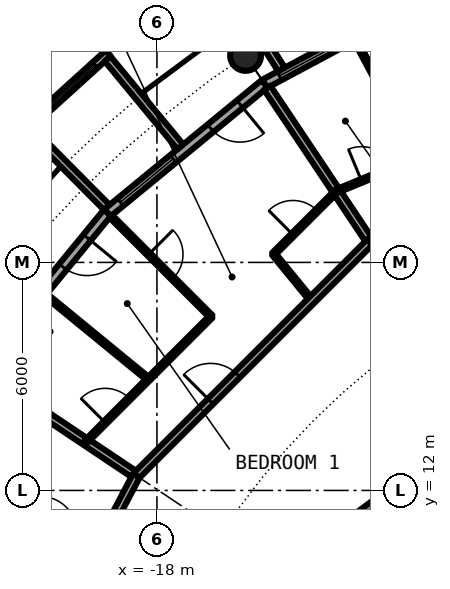
"""IFC4 building model, lengths in metres.
Left out: names, types, materials, properties, quantities, classifications, styles, units other than length and angle.
Written with IfcOpenShell. Run it as: python <this file> out.ifc"""

import sys

from ifc_helpers import new_model, si_unit, direction, frame, frame_2d, origin, origin_2d, place, context, subcontext, project, spatial, rectangle, circle, hollow_circle, extrude, element, fill, save


model = new_model("IFC4")
c1 = context("Model", 3, precision=1e-05, world=origin(), true_north=direction((0.0, 1.0)))
c2 = subcontext(c1, "Body", "Model", "MODEL_VIEW")
j1 = project(units=[si_unit("LENGTHUNIT", "METRE"), si_unit("PLANEANGLEUNIT", "RADIAN")], contexts=[c1])
p1 = place(None, origin())
s1 = spatial("IfcSite", under=j1, at=p1, CompositionType="ELEMENT")
p2 = place(p1, origin())
s2 = spatial("IfcBuilding", under=s1, at=p2, CompositionType="ELEMENT")
p3 = place(p2, frame((0.0, 0.0, 170.75)))
s3 = spatial("IfcBuildingStorey", under=s2, at=p3, CompositionType="ELEMENT", Elevation=170.75)
p4 = place(p3, frame((-15.667, 23.448, 0.0), z_axis=(0.0, 0.0, 1.0), x_axis=(1.0, 0.0, 0.0)))
e1 = element("IfcColumn", 1, at=p4, inside=s3, PredefinedType="COLUMN", context=c2, shape_type="SweptSolid", body=[
    extrude(hollow_circle(Radius=0.406, WallThickness=0.04, at=origin_2d()), origin(), (0.0, 0.0, 1.0), 3.05),
])
p5 = place(p3, frame((-10.447, 25.222, 0.0), z_axis=(0.0, 0.0, 1.0), x_axis=(-0.881915646801, -0.471407246368, 0.0)))
e2 = element("IfcWall", 2, at=p5, inside=s3, PredefinedType="SOLIDWALL", context=c2, shape_type="SweptSolid", body=[
    extrude(rectangle(XDim=5.352, YDim=0.25, at=frame_2d((2.676, 0.0))), origin(), (0.0, 0.0, 1.0), 2.7),
])
p6 = place(p5, frame((0.841, 0.0, 0.0)))
e3 = element("IfcOpeningElement", 3, at=p6, cuts=e2, PredefinedType="OPENING", context=c2, shape_type="SweptSolid", body=[
    extrude(rectangle(XDim=1.0, YDim=2.2, at=frame_2d((0.5, 1.1))), frame((0.0, 0.135, 0.0), z_axis=(0.0, -1.0, 0.0), x_axis=(1.0, 0.0, 0.0)), (0.0, 0.0, 1.0), 0.27),
])
p7 = place(p5, frame((3.111, 0.0, 0.3)))
e4 = element("IfcOpeningElement", 4, at=p7, cuts=e2, PredefinedType="OPENING", context=c2, shape_type="SweptSolid", body=[
    extrude(rectangle(XDim=1.8, YDim=2.1, at=frame_2d((0.9, 1.05))), frame((0.0, 0.135, 0.0), z_axis=(0.0, -1.0, 0.0), x_axis=(1.0, 0.0, 0.0)), (0.0, 0.0, 1.0), 0.27),
])
p8 = place(p3, frame((-14.722, 23.079, -0.03), z_axis=(0.0, 0.0, 1.0), x_axis=(-0.537572179146, 0.843217737129, 0.0)))
e5 = element("IfcWall", 5, at=p8, inside=s3, PredefinedType="SOLIDWALL", context=c2, shape_type="SweptSolid", body=[
    extrude(rectangle(XDim=2.924, YDim=0.2, at=frame_2d((1.462, 0.0))), origin(), (0.0, 0.0, 1.0), 2.73),
])
p9 = place(p3, frame((-15.167, 22.699, 0.0), z_axis=(0.0, 0.0, 1.0), x_axis=(-0.773019449054, -0.634382322723, 0.0)))
e6 = element("IfcWall", 6, at=p9, inside=s3, PredefinedType="SOLIDWALL", context=c2, shape_type="SweptSolid", body=[
    extrude(rectangle(XDim=5.352, YDim=0.25, at=frame_2d((2.676, 0.0))), origin(), (0.0, 0.0, 1.0), 2.7),
])
p10 = place(p9, frame((0.841, 0.0, 0.0)))
e7 = element("IfcOpeningElement", 7, at=p10, cuts=e6, PredefinedType="OPENING", context=c2, shape_type="SweptSolid", body=[
    extrude(rectangle(XDim=1.0, YDim=2.2, at=frame_2d((0.5, 1.1))), frame((0.0, 0.135, 0.0), z_axis=(0.0, -1.0, 0.0), x_axis=(1.0, 0.0, 0.0)), (0.0, 0.0, 1.0), 0.27),
])
p11 = place(p9, frame((3.111, 0.0, 0.3)))
e8 = element("IfcOpeningElement", 8, at=p11, cuts=e6, PredefinedType="OPENING", context=c2, shape_type="SweptSolid", body=[
    extrude(rectangle(XDim=1.8, YDim=2.1, at=frame_2d((0.9, 1.05))), frame((0.0, 0.135, 0.0), z_axis=(0.0, -1.0, 0.0), x_axis=(1.0, 0.0, 0.0)), (0.0, 0.0, 1.0), 0.27),
])
p12 = place(p3, frame((-19.282, 23.503, -0.03), z_axis=(0.0, 0.0, 1.0), x_axis=(-0.740998365753, -0.671506829416, 0.0)))
e9 = element("IfcWall", 9, at=p12, inside=s3, PredefinedType="SOLIDWALL", context=c2, shape_type="SweptSolid", body=[
    extrude(rectangle(XDim=2.993, YDim=0.2, at=frame_2d((1.497, 0.0))), origin(), (0.0, 0.0, 1.0), 2.73),
])
p13 = place(p12, frame((0.457, 0.0, 0.33)))
e10 = element("IfcOpeningElement", 10, at=p13, cuts=e9, PredefinedType="OPENING", context=c2, shape_type="SweptSolid", body=[
    extrude(circle(Radius=1.04, at=frame_2d((1.04, 1.04))), frame((0.0, 0.11, 0.0), z_axis=(0.0, -1.0, 0.0), x_axis=(1.0, 0.0, 0.0)), (0.0, 0.0, 1.0), 0.22),
])
p14 = place(p3, frame((-17.384, 21.041, -0.03), z_axis=(0.0, 0.0, 1.0), x_axis=(-0.63709551667, 0.770784861449, 0.0)))
e11 = element("IfcWall", 11, at=p14, inside=s3, PredefinedType="SOLIDWALL", context=c2, shape_type="SweptSolid", body=[
    extrude(rectangle(XDim=3.006, YDim=0.2, at=frame_2d((1.503, 0.0))), origin(), (0.0, 0.0, 1.0), 2.73),
])
p15 = place(p3, frame((-19.323, 19.45, -0.03), z_axis=(0.0, 0.0, 1.0), x_axis=(-0.704476739375, 0.709727076896, 0.0)))
e12 = element("IfcWall", 12, at=p15, inside=s3, PredefinedType="SOLIDWALL", context=c2, shape_type="SweptSolid", body=[
    extrude(rectangle(XDim=2.883, YDim=0.2, at=frame_2d((1.441, 0.0))), origin(), (0.0, 0.0, 1.0), 2.73),
])
p16 = place(p3, frame((-19.304, 19.304, 0.0), z_axis=(0.0, 0.0, 1.0), x_axis=(-0.634382322723, -0.773019449054, 0.0)))
e13 = element("IfcWall", 13, at=p16, inside=s3, PredefinedType="SOLIDWALL", context=c2, shape_type="SweptSolid", body=[
    extrude(rectangle(XDim=5.352, YDim=0.25, at=frame_2d((2.676, 0.0))), origin(), (0.0, 0.0, 1.0), 2.7),
])
p17 = place(p16, frame((0.841, 0.0, 0.0)))
e14 = element("IfcOpeningElement", 14, at=p17, cuts=e13, PredefinedType="OPENING", context=c2, shape_type="SweptSolid", body=[
    extrude(rectangle(XDim=1.0, YDim=2.2, at=frame_2d((0.5, 1.1))), frame((0.0, 0.135, 0.0), z_axis=(0.0, -1.0, 0.0), x_axis=(1.0, 0.0, 0.0)), (0.0, 0.0, 1.0), 0.27),
])
p18 = place(p16, frame((3.111, 0.0, 0.3)))
e15 = element("IfcOpeningElement", 15, at=p18, cuts=e13, PredefinedType="OPENING", context=c2, shape_type="SweptSolid", body=[
    extrude(rectangle(XDim=1.8, YDim=2.1, at=frame_2d((0.9, 1.05))), frame((0.0, 0.135, 0.0), z_axis=(0.0, -1.0, 0.0), x_axis=(1.0, 0.0, 0.0)), (0.0, 0.0, 1.0), 0.27),
])
p19 = place(p3, frame((-22.595, 15.098, 0.0), z_axis=(0.0, 0.0, 1.0), x_axis=(0.831387096605, -0.55569370664, 0.0)))
e16 = element("IfcWall", 16, at=p19, inside=s3, PredefinedType="PARTITIONING", context=c2, shape_type="SweptSolid", body=[
    extrude(rectangle(XDim=4.875, YDim=0.2, at=frame_2d((2.438, 0.0))), origin(), (0.0, 0.0, 1.0), 2.7),
])
p20 = place(p3, frame((-21.023, 17.22, 0.0), z_axis=(0.0, 0.0, 1.0), x_axis=(0.773548271597, -0.633737383709, 0.0)))
e17 = element("IfcWall", 17, at=p20, inside=s3, PredefinedType="PARTITIONING", context=c2, shape_type="SweptSolid", body=[
    extrude(rectangle(XDim=3.618, YDim=0.1, at=frame_2d((1.809, 0.0))), origin(), (0.0, 0.0, 1.0), 2.7),
])
p21 = place(p3, frame((-19.216, 19.216, 0.0), z_axis=(0.0, 0.0, 1.0), x_axis=(0.707106781187, -0.707106781187, 0.0)))
e18 = element("IfcWall", 18, at=p21, inside=s3, PredefinedType="PARTITIONING", context=c2, shape_type="SweptSolid", body=[
    extrude(rectangle(XDim=3.735, YDim=0.1, at=frame_2d((1.868, 0.0))), origin(), (0.0, 0.0, 1.0), 2.7),
])
p22 = place(p21, frame((1.417, 0.0, 0.0)))
e19 = element("IfcOpeningElement", 19, at=p22, cuts=e18, PredefinedType="OPENING", context=c2, shape_type="SweptSolid", body=[
    extrude(rectangle(XDim=0.9, YDim=2.3, at=frame_2d((0.45, 1.15))), frame((0.0, 0.06, 0.0), z_axis=(0.0, -1.0, 0.0), x_axis=(1.0, 0.0, 0.0)), (0.0, 0.0, 1.0), 0.12),
])
p23 = place(p3, frame((-15.098, 22.595, 0.0), z_axis=(0.0, 0.0, 1.0), x_axis=(0.55569370664, -0.831387096605, 0.0)))
e20 = element("IfcWall", 20, at=p23, inside=s3, PredefinedType="PARTITIONING", context=c2, shape_type="SweptSolid", body=[
    extrude(rectangle(XDim=4.875, YDim=0.2, at=frame_2d((2.438, 0.0))), origin(), (0.0, 0.0, 1.0), 2.7),
])
p24 = place(p3, frame((-14.93, 18.222, 0.0), z_axis=(0.0, 0.0, 1.0), x_axis=(0.633633636523, -0.773633255921, 0.0)))
e21 = element("IfcWall", 21, at=p24, inside=s3, PredefinedType="PARTITIONING", context=c2, shape_type="SweptSolid", body=[
    extrude(rectangle(XDim=1.578, YDim=0.1, at=frame_2d((0.789, 0.0))), origin(), (0.0, 0.0, 1.0), 2.7),
])
p25 = place(p3, frame((-12.833, 23.954, 0.0), z_axis=(0.0, 0.0, 1.0), x_axis=(0.472212052488, -0.881484984265, 0.0)))
e22 = element("IfcWall", 22, at=p25, inside=s3, PredefinedType="PARTITIONING", context=c2, shape_type="SweptSolid", body=[
    extrude(rectangle(XDim=3.619, YDim=0.1, at=frame_2d((1.81, 0.0))), origin(), (0.0, 0.0, 1.0), 2.7),
])
p26 = place(p3, frame((-13.349, 10.848, 0.0), z_axis=(0.0, 0.0, 1.0), x_axis=(0.803229232922, 0.595670042371, 0.0)))
e23 = element("IfcWall", 23, at=p26, inside=s3, PredefinedType="PARTITIONING", context=c2, shape_type="SweptSolid", body=[
    extrude(rectangle(XDim=10.224, YDim=0.2, at=frame_2d((5.112, 0.0))), origin(), (0.0, 0.0, 1.0), 2.7),
])
p27 = place(p26, frame((4.612, 0.0, 0.0)))
e24 = element("IfcOpeningElement", 24, at=p27, cuts=e23, PredefinedType="OPENING", context=c2, shape_type="SweptSolid", body=[
    extrude(rectangle(XDim=1.0, YDim=2.3, at=frame_2d((0.5, 1.15))), frame((0.0, 0.11, 0.0), z_axis=(0.0, -1.0, 0.0), x_axis=(1.0, 0.0, 0.0)), (0.0, 0.0, 1.0), 0.22),
])
p28 = place(p3, frame((-18.542, 12.389, 0.0), z_axis=(0.0, 0.0, 1.0), x_axis=(0.707106781187, 0.707106781187, 0.0)))
e25 = element("IfcWall", 25, at=p28, inside=s3, PredefinedType="PARTITIONING", context=c2, shape_type="SweptSolid", body=[
    extrude(rectangle(XDim=8.702, YDim=0.2, at=frame_2d((4.351, 0.0))), origin(), (0.0, 0.0, 1.0), 2.7),
])
p29 = place(p28, frame((2.763, 0.0, 0.0)))
e26 = element("IfcOpeningElement", 26, at=p29, cuts=e25, PredefinedType="OPENING", context=c2, shape_type="SweptSolid", body=[
    extrude(rectangle(XDim=1.0, YDim=2.3, at=frame_2d((0.5, 1.15))), frame((0.0, 0.11, 0.0), z_axis=(0.0, -1.0, 0.0), x_axis=(1.0, 0.0, 0.0)), (0.0, 0.0, 1.0), 0.22),
])
p30 = place(p3, frame((-12.396, 18.536, 0.0), z_axis=(0.0, 0.0, 1.0), x_axis=(0.923722518166, 0.383062278792, 0.0)))
e27 = element("IfcWall", 27, at=p30, inside=s3, PredefinedType="PARTITIONING", context=c2, shape_type="SweptSolid", body=[
    extrude(rectangle(XDim=8.709, YDim=0.2, at=frame_2d((4.354, 0.0))), origin(), (0.0, 0.0, 1.0), 2.7),
])
p31 = place(p30, frame((2.772, 0.0, 0.0)))
e28 = element("IfcOpeningElement", 28, at=p31, cuts=e27, PredefinedType="OPENING", context=c2, shape_type="SweptSolid", body=[
    extrude(rectangle(XDim=1.0, YDim=2.3, at=frame_2d((0.5, 1.15))), frame((0.0, 0.11, 0.0), z_axis=(0.0, -1.0, 0.0), x_axis=(1.0, 0.0, 0.0)), (0.0, 0.0, 1.0), 0.22),
])
p32 = place(p3, frame((-19.307, 10.935, 0.0), z_axis=(0.0, 0.0, 1.0), x_axis=(0.465605550524, 0.884992356646, 0.0)))
e29 = element("IfcWall", 29, at=p32, inside=s3, PredefinedType="PARTITIONING", context=c2, shape_type="SweptSolid", body=[
    extrude(rectangle(XDim=1.643, YDim=0.2, at=frame_2d((0.821, 0.0))), origin(), (0.0, 0.0, 1.0), 2.7),
])
p33 = place(p3, frame((-19.872, 13.278, 0.0), z_axis=(0.0, 0.0, 1.0), x_axis=(0.707132961115, 0.707080600289, 0.0)))
e30 = element("IfcWall", 30, at=p33, inside=s3, PredefinedType="PARTITIONING", context=c2, shape_type="SweptSolid", body=[
    extrude(rectangle(XDim=4.663, YDim=0.1, at=frame_2d((2.331, 0.0))), origin(), (0.0, 0.0, 1.0), 2.7),
])
p34 = place(p33, frame((0.719, 0.0, 0.0)))
e31 = element("IfcOpeningElement", 31, at=p34, cuts=e30, PredefinedType="OPENING", context=c2, shape_type="SweptSolid", body=[
    extrude(rectangle(XDim=0.9, YDim=2.3, at=frame_2d((0.45, 1.15))), frame((0.0, 0.06, 0.0), z_axis=(0.0, -1.0, 0.0), x_axis=(1.0, 0.0, 0.0)), (0.0, 0.0, 1.0), 0.12),
])
p35 = place(p3, frame((-14.932, 18.218, 0.0), z_axis=(0.0, 0.0, 1.0), x_axis=(0.707106781187, 0.707106781187, 0.0)))
e32 = element("IfcWall", 32, at=p35, inside=s3, PredefinedType="PARTITIONING", context=c2, shape_type="SweptSolid", body=[
    extrude(rectangle(XDim=2.332, YDim=0.1, at=frame_2d((1.166, 0.0))), origin(), (0.0, 0.0, 1.0), 2.7),
])
p36 = place(p35, frame((0.723, 0.0, 0.0)))
e33 = element("IfcOpeningElement", 33, at=p36, cuts=e32, PredefinedType="OPENING", context=c2, shape_type="SweptSolid", body=[
    extrude(rectangle(XDim=0.9, YDim=2.3, at=frame_2d((0.45, 1.15))), frame((0.0, 0.06, 0.0), z_axis=(0.0, -1.0, 0.0), x_axis=(1.0, 0.0, 0.0)), (0.0, 0.0, 1.0), 0.12),
])
p37 = place(p3, frame((-13.278, 19.872, 0.0), z_axis=(0.0, 0.0, 1.0), x_axis=(0.923920484476, 0.38258455061, 0.0)))
e34 = element("IfcWall", 34, at=p37, inside=s3, PredefinedType="PARTITIONING", context=c2, shape_type="SweptSolid", body=[
    extrude(rectangle(XDim=4.663, YDim=0.1, at=frame_2d((2.332, 0.0))), origin(), (0.0, 0.0, 1.0), 2.7),
])
p38 = place(p37, frame((0.716, 0.0, 0.0)))
e35 = element("IfcOpeningElement", 35, at=p38, cuts=e34, PredefinedType="OPENING", context=c2, shape_type="SweptSolid", body=[
    extrude(rectangle(XDim=0.9, YDim=2.3, at=frame_2d((0.45, 1.15))), frame((0.0, 0.06, 0.0), z_axis=(0.0, -1.0, 0.0), x_axis=(1.0, 0.0, 0.0)), (0.0, 0.0, 1.0), 0.12),
])
p39 = place(p7, origin())
e36 = element("IfcWindow", 36, at=p39, inside=s3, PartitioningType="SINGLE_PANEL", PredefinedType="WINDOW", context=c2, shape_type="SweptSolid", body=[
    extrude(rectangle(XDim=1.8, YDim=2.1, at=frame_2d((0.9, 1.05))), frame((0.0, 0.03, 0.0), z_axis=(0.0, -1.0, 0.0), x_axis=(1.0, 0.0, 0.0)), (0.0, 0.0, 1.0), 0.06),
])
fill(e4, e36)
p40 = place(p10, origin())
e37 = element("IfcDoor", 37, at=p40, inside=s3, OperationType="SINGLE_SWING_LEFT", PredefinedType="DOOR", context=c2, shape_type="SweptSolid", body=[
    extrude(rectangle(XDim=1.0, YDim=2.2, at=frame_2d((0.5, 1.1))), frame((0.0, 0.025, 0.0), z_axis=(0.0, -1.0, 0.0), x_axis=(1.0, 0.0, 0.0)), (0.0, 0.0, 1.0), 0.05),
])
fill(e7, e37)
p41 = place(p11, origin())
e38 = element("IfcWindow", 38, at=p41, inside=s3, PartitioningType="SINGLE_PANEL", PredefinedType="WINDOW", context=c2, shape_type="SweptSolid", body=[
    extrude(rectangle(XDim=1.8, YDim=2.1, at=frame_2d((0.9, 1.05))), frame((0.0, 0.03, 0.0), z_axis=(0.0, -1.0, 0.0), x_axis=(1.0, 0.0, 0.0)), (0.0, 0.0, 1.0), 0.06),
])
fill(e8, e38)
p42 = place(p13, origin())
e39 = element("IfcWindow", 39, at=p42, inside=s3, PartitioningType="SINGLE_PANEL", PredefinedType="WINDOW", context=c2, shape_type="SweptSolid", body=[
    extrude(circle(Radius=1.04, at=frame_2d((1.04, 1.04))), frame((0.0, 0.03, 0.0), z_axis=(0.0, -1.0, 0.0), x_axis=(1.0, 0.0, 0.0)), (0.0, 0.0, 1.0), 0.06),
])
fill(e10, e39)
p43 = place(p17, origin())
e40 = element("IfcDoor", 40, at=p43, inside=s3, OperationType="SINGLE_SWING_LEFT", PredefinedType="DOOR", context=c2, shape_type="SweptSolid", body=[
    extrude(rectangle(XDim=1.0, YDim=2.2, at=frame_2d((0.5, 1.1))), frame((0.0, 0.025, 0.0), z_axis=(0.0, -1.0, 0.0), x_axis=(1.0, 0.0, 0.0)), (0.0, 0.0, 1.0), 0.05),
])
fill(e14, e40)
p44 = place(p38, origin())
e41 = element("IfcDoor", 41, at=p44, inside=s3, OperationType="SINGLE_SWING_LEFT", PredefinedType="DOOR", context=c2, shape_type="SweptSolid", body=[
    extrude(rectangle(XDim=0.9, YDim=2.3, at=frame_2d((0.45, 1.15))), frame((0.0, 0.025, 0.0), z_axis=(0.0, -1.0, 0.0), x_axis=(1.0, 0.0, 0.0)), (0.0, 0.0, 1.0), 0.05),
])
fill(e35, e41)
p45 = place(p29, origin())
e42 = element("IfcDoor", 42, at=p45, inside=s3, OperationType="SINGLE_SWING_LEFT", PredefinedType="DOOR", context=c2, shape_type="SweptSolid", body=[
    extrude(rectangle(XDim=1.0, YDim=2.3, at=frame_2d((0.5, 1.15))), frame((0.0, 0.025, 0.0), z_axis=(0.0, -1.0, 0.0), x_axis=(1.0, 0.0, 0.0)), (0.0, 0.0, 1.0), 0.05),
])
fill(e26, e42)
p46 = place(p36, origin())
e43 = element("IfcDoor", 43, at=p46, inside=s3, OperationType="SINGLE_SWING_RIGHT", PredefinedType="DOOR", context=c2, shape_type="SweptSolid", body=[
    extrude(rectangle(XDim=0.9, YDim=2.3, at=frame_2d((0.45, 1.15))), frame((0.0, 0.025, 0.0), z_axis=(0.0, -1.0, 0.0), x_axis=(1.0, 0.0, 0.0)), (0.0, 0.0, 1.0), 0.05),
])
fill(e33, e43)
p47 = place(p22, origin())
e44 = element("IfcDoor", 44, at=p47, inside=s3, OperationType="SINGLE_SWING_LEFT", PredefinedType="DOOR", context=c2, shape_type="SweptSolid", body=[
    extrude(rectangle(XDim=0.9, YDim=2.3, at=frame_2d((0.45, 1.15))), frame((0.0, 0.025, 0.0), z_axis=(0.0, -1.0, 0.0), x_axis=(1.0, 0.0, 0.0)), (0.0, 0.0, 1.0), 0.05),
])
fill(e19, e44)
p48 = place(p34, origin())
e45 = element("IfcDoor", 45, at=p48, inside=s3, OperationType="SINGLE_SWING_LEFT", PredefinedType="DOOR", context=c2, shape_type="SweptSolid", body=[
    extrude(rectangle(XDim=0.9, YDim=2.3, at=frame_2d((0.45, 1.15))), frame((0.0, 0.025, 0.0), z_axis=(0.0, -1.0, 0.0), x_axis=(1.0, 0.0, 0.0)), (0.0, 0.0, 1.0), 0.05),
])
fill(e31, e45)
save(model, sys.argv[1])
